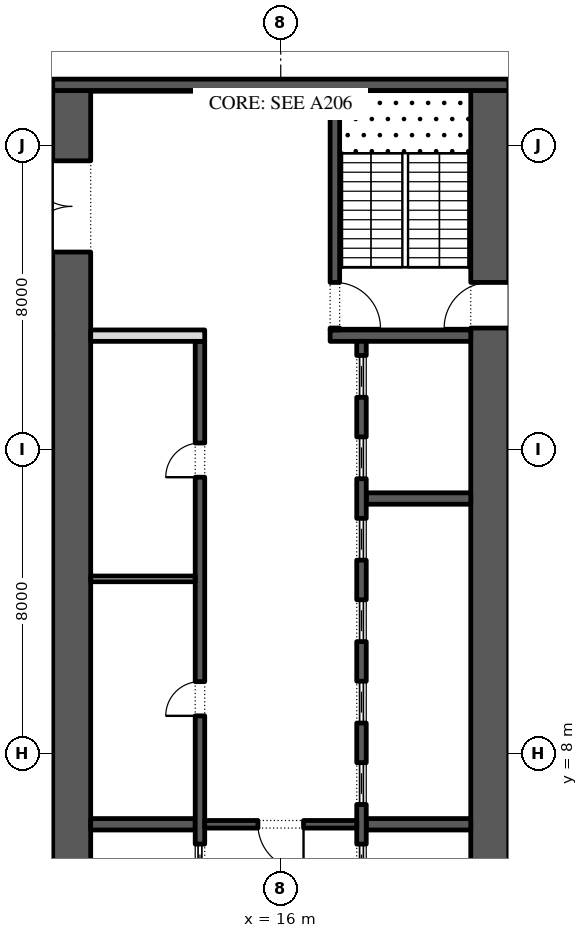
"""IFC4 building model, lengths in metres.
Left out: names, types, materials, properties, quantities, classifications, styles, units other than length and angle.
Written with IfcOpenShell. Run it as: python <this file> out.ifc"""

import sys

from ifc_helpers import new_model, si_unit, direction, frame, frame_2d, origin, place, context, subcontext, project, spatial, rectangle, extrude, element, fill, save


model = new_model("IFC4")
c1 = context("Model", 3, precision=1e-05, world=origin(), true_north=direction((0.0, 1.0)))
c2 = subcontext(c1, "Body", "Model", "MODEL_VIEW")
j1 = project(units=[si_unit("LENGTHUNIT", "METRE"), si_unit("PLANEANGLEUNIT", "RADIAN")], contexts=[c1])
p1 = place(None, origin())
s1 = spatial("IfcSite", under=j1, at=p1, CompositionType="ELEMENT")
p2 = place(p1, origin())
s2 = spatial("IfcBuilding", under=s1, at=p2, CompositionType="ELEMENT")
p3 = place(p2, frame((0.0, 0.0, 19.2)))
s3 = spatial("IfcBuildingStorey", under=s2, at=p3, CompositionType="ELEMENT", Elevation=19.2)
p4 = place(p3, frame((21.5, -2.45, 0.0), z_axis=(0.0, 0.0, 1.0), x_axis=(0.0, 1.0, 0.0)))
e1 = element("IfcWall", 1, at=p4, inside=s3, PredefinedType="SHEAR", context=c2, shape_type="SweptSolid", body=[
    extrude(rectangle(XDim=27.9, YDim=1.0, at=frame_2d((13.95, 0.0))), origin(), (0.0, 0.0, 1.0), 4.5),
])
p5 = place(p4, frame((5.05, 0.0, 0.0)))
e2 = element("IfcOpeningElement", 2, at=p5, cuts=e1, PredefinedType="OPENING", context=c2, shape_type="SweptSolid", body=[
    extrude(rectangle(XDim=1.2, YDim=2.1, at=frame_2d((0.6, 1.05))), frame((0.0, 0.51, 0.0), z_axis=(0.0, -1.0, 0.0), x_axis=(1.0, 0.0, 0.0)), (0.0, 0.0, 1.0), 1.02),
])
p6 = place(p4, frame((21.65, 0.0, 0.0)))
e3 = element("IfcOpeningElement", 3, at=p6, cuts=e1, PredefinedType="OPENING", context=c2, shape_type="SweptSolid", body=[
    extrude(rectangle(XDim=1.2, YDim=2.1, at=frame_2d((0.6, 1.05))), frame((0.0, 0.51, 0.0), z_axis=(0.0, -1.0, 0.0), x_axis=(1.0, 0.0, 0.0)), (0.0, 0.0, 1.0), 1.02),
])
p7 = place(p3, frame((10.5, -2.45, 0.0), z_axis=(0.0, 0.0, 1.0), x_axis=(0.0, 1.0, 0.0)))
e4 = element("IfcWall", 4, at=p7, inside=s3, PredefinedType="SHEAR", context=c2, shape_type="SweptSolid", body=[
    extrude(rectangle(XDim=27.9, YDim=1.0, at=frame_2d((13.95, 0.0))), origin(), (0.0, 0.0, 1.0), 4.5),
])
p8 = place(p7, frame((23.65, 0.0, 0.0)))
e5 = element("IfcOpeningElement", 5, at=p8, cuts=e4, PredefinedType="OPENING", context=c2, shape_type="SweptSolid", body=[
    extrude(rectangle(XDim=2.4, YDim=2.1, at=frame_2d((1.2, 1.05))), frame((0.0, 0.51, 0.0), z_axis=(0.0, -1.0, 0.0), x_axis=(1.0, 0.0, 0.0)), (0.0, 0.0, 1.0), 1.02),
])
p9 = place(p7, frame((1.387, 0.0, 0.0)))
e6 = element("IfcOpeningElement", 6, at=p9, cuts=e4, PredefinedType="OPENING", context=c2, shape_type="SweptSolid", body=[
    extrude(rectangle(XDim=0.9, YDim=2.1, at=frame_2d((0.45, 1.05))), frame((0.0, 0.51, 0.0), z_axis=(0.0, -1.0, 0.0), x_axis=(1.0, 0.0, 0.0)), (0.0, 0.0, 1.0), 1.02),
])
p10 = place(p7, frame((4.613, 0.0, 0.0)))
e7 = element("IfcOpeningElement", 7, at=p10, cuts=e4, PredefinedType="OPENING", context=c2, shape_type="SweptSolid", body=[
    extrude(rectangle(XDim=0.9, YDim=2.1, at=frame_2d((0.45, 1.05))), frame((0.0, 0.51, 0.0), z_axis=(0.0, -1.0, 0.0), x_axis=(1.0, 0.0, 0.0)), (0.0, 0.0, 1.0), 1.02),
])
p11 = place(p3, frame((10.0, 25.6, 0.0), z_axis=(0.0, 0.0, 1.0), x_axis=(1.0, 0.0, 0.0)))
e8 = element("IfcWall", 8, at=p11, inside=s3, PredefinedType="SHEAR", context=c2, shape_type="SweptSolid", body=[
    extrude(rectangle(XDim=12.0, YDim=0.3, at=frame_2d((6.0, 0.0))), origin(), (0.0, 0.0, 1.0), 4.5),
])
p12 = place(p3, frame((17.3, 19.0, 0.0), z_axis=(0.0, 0.0, 1.0), x_axis=(1.0, 0.0, 0.0)))
e9 = element("IfcWall", 9, at=p12, inside=s3, PredefinedType="SHEAR", context=c2, shape_type="SweptSolid", body=[
    extrude(rectangle(XDim=3.7, YDim=0.3, at=frame_2d((1.85, 0.0))), origin(), (0.0, 0.0, 1.0), 4.5),
])
p13 = place(p3, frame((17.425, 19.15, 0.0), z_axis=(0.0, 0.0, 1.0), x_axis=(0.0, 1.0, 0.0)))
e10 = element("IfcWall", 10, at=p13, inside=s3, PredefinedType="SHEAR", context=c2, shape_type="SweptSolid", body=[
    extrude(rectangle(XDim=6.3, YDim=0.25, at=frame_2d((3.15, 0.0))), origin(), (0.0, 0.0, 1.0), 4.5),
])
p14 = place(p13, frame((0.05, 0.0, 0.0)))
e11 = element("IfcOpeningElement", 11, at=p14, cuts=e10, PredefinedType="OPENING", context=c2, shape_type="SweptSolid", body=[
    extrude(rectangle(XDim=1.2, YDim=2.1, at=frame_2d((0.6, 1.05))), frame((0.0, 0.135, 0.0), z_axis=(0.0, -1.0, 0.0), x_axis=(1.0, 0.0, 0.0)), (0.0, 0.0, 1.0), 0.27),
])
for number, where, z_axis, x_axis in (
    (12, (18.25, 6.143, 0.0), (0.0, 0.0, 1.0), (1.0, 0.0, 0.0)),
    (13, (18.25, 14.714, 0.0), (0.0, 0.0, 1.0), (1.0, 0.0, 0.0)),
):
    element("IfcWall", number, at=place(p3, frame(where, z_axis=z_axis, x_axis=x_axis)), inside=s3, PredefinedType="SHEAR", context=c2, shape_type="SweptSolid", body=[
        extrude(rectangle(XDim=2.75, YDim=0.3, at=frame_2d((1.375, 0.0))), origin(), (0.0, 0.0, 1.0), 4.5),
    ])
p15 = place(p3, frame((18.125, 4.15, 0.0), z_axis=(0.0, 0.0, 1.0), x_axis=(0.0, 1.0, 0.0)))
e14 = element("IfcWall", 14, at=p15, inside=s3, PredefinedType="SHEAR", context=c2, shape_type="SweptSolid", body=[
    extrude(rectangle(XDim=14.7, YDim=0.25, at=frame_2d((7.35, 0.0))), origin(), (0.0, 0.0, 1.0), 4.5),
])
p16 = place(p15, frame((0.371, 0.0, 0.0)))
e15 = element("IfcOpeningElement", 15, at=p16, cuts=e14, PredefinedType="OPENING", context=c2, shape_type="SweptSolid", body=[
    extrude(rectangle(XDim=1.1, YDim=2.1, at=frame_2d((0.55, 1.05))), frame((0.0, 0.135, 0.0), z_axis=(0.0, -1.0, 0.0), x_axis=(1.0, 0.0, 0.0)), (0.0, 0.0, 1.0), 0.27),
])
p17 = place(p15, frame((2.514, 0.0, 0.0)))
e16 = element("IfcOpeningElement", 16, at=p17, cuts=e14, PredefinedType="OPENING", context=c2, shape_type="SweptSolid", body=[
    extrude(rectangle(XDim=1.1, YDim=2.1, at=frame_2d((0.55, 1.05))), frame((0.0, 0.135, 0.0), z_axis=(0.0, -1.0, 0.0), x_axis=(1.0, 0.0, 0.0)), (0.0, 0.0, 1.0), 0.27),
])
p18 = place(p15, frame((4.657, 0.0, 0.0)))
e17 = element("IfcOpeningElement", 17, at=p18, cuts=e14, PredefinedType="OPENING", context=c2, shape_type="SweptSolid", body=[
    extrude(rectangle(XDim=1.1, YDim=2.1, at=frame_2d((0.55, 1.05))), frame((0.0, 0.135, 0.0), z_axis=(0.0, -1.0, 0.0), x_axis=(1.0, 0.0, 0.0)), (0.0, 0.0, 1.0), 0.27),
])
p19 = place(p15, frame((6.8, 0.0, 0.0)))
e18 = element("IfcOpeningElement", 18, at=p19, cuts=e14, PredefinedType="OPENING", context=c2, shape_type="SweptSolid", body=[
    extrude(rectangle(XDim=1.1, YDim=2.1, at=frame_2d((0.55, 1.05))), frame((0.0, 0.135, 0.0), z_axis=(0.0, -1.0, 0.0), x_axis=(1.0, 0.0, 0.0)), (0.0, 0.0, 1.0), 0.27),
])
p20 = place(p15, frame((8.943, 0.0, 0.0)))
e19 = element("IfcOpeningElement", 19, at=p20, cuts=e14, PredefinedType="OPENING", context=c2, shape_type="SweptSolid", body=[
    extrude(rectangle(XDim=1.1, YDim=2.1, at=frame_2d((0.55, 1.05))), frame((0.0, 0.135, 0.0), z_axis=(0.0, -1.0, 0.0), x_axis=(1.0, 0.0, 0.0)), (0.0, 0.0, 1.0), 0.27),
])
p21 = place(p15, frame((11.086, 0.0, 0.0)))
e20 = element("IfcOpeningElement", 20, at=p21, cuts=e14, PredefinedType="OPENING", context=c2, shape_type="SweptSolid", body=[
    extrude(rectangle(XDim=1.1, YDim=2.1, at=frame_2d((0.55, 1.05))), frame((0.0, 0.135, 0.0), z_axis=(0.0, -1.0, 0.0), x_axis=(1.0, 0.0, 0.0)), (0.0, 0.0, 1.0), 0.27),
])
p22 = place(p15, frame((13.229, 0.0, 0.0)))
e21 = element("IfcOpeningElement", 21, at=p22, cuts=e14, PredefinedType="OPENING", context=c2, shape_type="SweptSolid", body=[
    extrude(rectangle(XDim=1.1, YDim=2.1, at=frame_2d((0.55, 1.05))), frame((0.0, 0.135, 0.0), z_axis=(0.0, -1.0, 0.0), x_axis=(1.0, 0.0, 0.0)), (0.0, 0.0, 1.0), 0.27),
])
p23 = place(p3, frame((11.0, 6.143, 0.0), z_axis=(0.0, 0.0, 1.0), x_axis=(1.0, 0.0, 0.0)))
e22 = element("IfcWall", 22, at=p23, inside=s3, PredefinedType="SHEAR", context=c2, shape_type="SweptSolid", body=[
    extrude(rectangle(XDim=2.75, YDim=0.3, at=frame_2d((1.375, 0.0))), origin(), (0.0, 0.0, 1.0), 4.5),
])
p24 = place(p3, frame((13.875, -2.45, 0.0), z_axis=(0.0, 0.0, 1.0), x_axis=(0.0, 1.0, 0.0)))
e23 = element("IfcWall", 23, at=p24, inside=s3, PredefinedType="SHEAR", context=c2, shape_type="SweptSolid", body=[
    extrude(rectangle(XDim=21.3, YDim=0.25, at=frame_2d((10.65, 0.0))), origin(), (0.0, 0.0, 1.0), 4.5),
])
p25 = place(p24, frame((11.446, 0.0, 0.0)))
e24 = element("IfcOpeningElement", 24, at=p25, cuts=e23, PredefinedType="OPENING", context=c2, shape_type="SweptSolid", body=[
    extrude(rectangle(XDim=0.9, YDim=2.1, at=frame_2d((0.45, 1.05))), frame((0.0, 0.135, 0.0), z_axis=(0.0, -1.0, 0.0), x_axis=(1.0, 0.0, 0.0)), (0.0, 0.0, 1.0), 0.27),
])
p26 = place(p24, frame((17.725, 0.0, 0.0)))
e25 = element("IfcOpeningElement", 25, at=p26, cuts=e23, PredefinedType="OPENING", context=c2, shape_type="SweptSolid", body=[
    extrude(rectangle(XDim=0.9, YDim=2.1, at=frame_2d((0.45, 1.05))), frame((0.0, 0.135, 0.0), z_axis=(0.0, -1.0, 0.0), x_axis=(1.0, 0.0, 0.0)), (0.0, 0.0, 1.0), 0.27),
])
p27 = place(p24, frame((6.971, 0.0, 0.0)))
e26 = element("IfcOpeningElement", 26, at=p27, cuts=e23, PredefinedType="OPENING", context=c2, shape_type="SweptSolid", body=[
    extrude(rectangle(XDim=1.1, YDim=2.1, at=frame_2d((0.55, 1.05))), frame((0.0, 0.135, 0.0), z_axis=(0.0, -1.0, 0.0), x_axis=(1.0, 0.0, 0.0)), (0.0, 0.0, 1.0), 0.27),
])
p28 = place(p3, frame((11.0, 19.0, 0.0), z_axis=(0.0, 0.0, 1.0), x_axis=(1.0, 0.0, 0.0)))
e27 = element("IfcWall", 27, at=p28, inside=s3, PredefinedType="PARTITIONING", context=c2, shape_type="SweptSolid", body=[
    extrude(rectangle(XDim=3.0, YDim=0.3, at=frame_2d((1.5, 0.0))), origin(), (0.0, 0.0, 1.0), 4.5),
])
p29 = place(p3, frame((11.0, 12.6, 0.0), z_axis=(0.0, 0.0, 1.0), x_axis=(1.0, 0.0, 0.0)))
e28 = element("IfcWall", 28, at=p29, inside=s3, PredefinedType="PARTITIONING", context=c2, shape_type="SweptSolid", body=[
    extrude(rectangle(XDim=2.75, YDim=0.15, at=frame_2d((1.375, 0.0))), origin(), (0.0, 0.0, 1.0), 4.5),
])
p30 = place(p3, frame((14.0, 6.143, 0.0), z_axis=(0.0, 0.0, 1.0), x_axis=(1.0, 0.0, 0.0)))
e29 = element("IfcWall", 29, at=p30, inside=s3, PredefinedType="SHEAR", context=c2, shape_type="SweptSolid", body=[
    extrude(rectangle(XDim=4.0, YDim=0.2, at=frame_2d((2.0, 0.0))), origin(), (0.0, 0.0, 1.0), 4.5),
])
p31 = place(p30, frame((1.4, 0.0, 0.0)))
e30 = element("IfcOpeningElement", 30, at=p31, cuts=e29, PredefinedType="OPENING", context=c2, shape_type="SweptSolid", body=[
    extrude(rectangle(XDim=1.2, YDim=2.1, at=frame_2d((0.6, 1.05))), frame((0.0, 0.11, 0.0), z_axis=(0.0, -1.0, 0.0), x_axis=(1.0, 0.0, 0.0)), (0.0, 0.0, 1.0), 0.22),
])
p32 = place(p16, origin())
e31 = element("IfcDoor", 31, at=p32, inside=s3, OperationType="SLIDING_TO_LEFT", PredefinedType="DOOR", context=c2, shape_type="SweptSolid", body=[
    extrude(rectangle(XDim=1.1, YDim=2.1, at=frame_2d((0.55, 1.05))), frame((0.0, 0.025, 0.0), z_axis=(0.0, -1.0, 0.0), x_axis=(1.0, 0.0, 0.0)), (0.0, 0.0, 1.0), 0.05),
])
fill(e15, e31)
p33 = place(p17, origin())
e32 = element("IfcDoor", 32, at=p33, inside=s3, OperationType="SLIDING_TO_LEFT", PredefinedType="DOOR", context=c2, shape_type="SweptSolid", body=[
    extrude(rectangle(XDim=1.1, YDim=2.1, at=frame_2d((0.55, 1.05))), frame((0.0, 0.025, 0.0), z_axis=(0.0, -1.0, 0.0), x_axis=(1.0, 0.0, 0.0)), (0.0, 0.0, 1.0), 0.05),
])
fill(e16, e32)
p34 = place(p18, origin())
e33 = element("IfcDoor", 33, at=p34, inside=s3, OperationType="SLIDING_TO_LEFT", PredefinedType="DOOR", context=c2, shape_type="SweptSolid", body=[
    extrude(rectangle(XDim=1.1, YDim=2.1, at=frame_2d((0.55, 1.05))), frame((0.0, 0.025, 0.0), z_axis=(0.0, -1.0, 0.0), x_axis=(1.0, 0.0, 0.0)), (0.0, 0.0, 1.0), 0.05),
])
fill(e17, e33)
p35 = place(p19, origin())
e34 = element("IfcDoor", 34, at=p35, inside=s3, OperationType="SLIDING_TO_LEFT", PredefinedType="DOOR", context=c2, shape_type="SweptSolid", body=[
    extrude(rectangle(XDim=1.1, YDim=2.1, at=frame_2d((0.55, 1.05))), frame((0.0, 0.025, 0.0), z_axis=(0.0, -1.0, 0.0), x_axis=(1.0, 0.0, 0.0)), (0.0, 0.0, 1.0), 0.05),
])
fill(e18, e34)
p36 = place(p20, origin())
e35 = element("IfcDoor", 35, at=p36, inside=s3, OperationType="SLIDING_TO_LEFT", PredefinedType="DOOR", context=c2, shape_type="SweptSolid", body=[
    extrude(rectangle(XDim=1.1, YDim=2.1, at=frame_2d((0.55, 1.05))), frame((0.0, 0.025, 0.0), z_axis=(0.0, -1.0, 0.0), x_axis=(1.0, 0.0, 0.0)), (0.0, 0.0, 1.0), 0.05),
])
fill(e19, e35)
p37 = place(p21, origin())
e36 = element("IfcDoor", 36, at=p37, inside=s3, OperationType="SLIDING_TO_LEFT", PredefinedType="DOOR", context=c2, shape_type="SweptSolid", body=[
    extrude(rectangle(XDim=1.1, YDim=2.1, at=frame_2d((0.55, 1.05))), frame((0.0, 0.025, 0.0), z_axis=(0.0, -1.0, 0.0), x_axis=(1.0, 0.0, 0.0)), (0.0, 0.0, 1.0), 0.05),
])
fill(e20, e36)
p38 = place(p22, origin())
e37 = element("IfcDoor", 37, at=p38, inside=s3, OperationType="SLIDING_TO_LEFT", PredefinedType="DOOR", context=c2, shape_type="SweptSolid", body=[
    extrude(rectangle(XDim=1.1, YDim=2.1, at=frame_2d((0.55, 1.05))), frame((0.0, 0.025, 0.0), z_axis=(0.0, -1.0, 0.0), x_axis=(1.0, 0.0, 0.0)), (0.0, 0.0, 1.0), 0.05),
])
fill(e21, e37)
p39 = place(p25, origin())
e38 = element("IfcDoor", 38, at=p39, inside=s3, OperationType="SINGLE_SWING_RIGHT", PredefinedType="DOOR", context=c2, shape_type="SweptSolid", body=[
    extrude(rectangle(XDim=0.9, YDim=2.1, at=frame_2d((0.45, 1.05))), frame((0.0, 0.125, 0.0), z_axis=(0.0, -1.0, 0.0), x_axis=(1.0, 0.0, 0.0)), (0.0, 0.0, 1.0), 0.05),
])
fill(e24, e38)
p40 = place(p26, origin())
e39 = element("IfcDoor", 39, at=p40, inside=s3, OperationType="SINGLE_SWING_RIGHT", PredefinedType="DOOR", context=c2, shape_type="SweptSolid", body=[
    extrude(rectangle(XDim=0.9, YDim=2.1, at=frame_2d((0.45, 1.05))), frame((0.0, 0.125, 0.0), z_axis=(0.0, -1.0, 0.0), x_axis=(1.0, 0.0, 0.0)), (0.0, 0.0, 1.0), 0.05),
])
fill(e25, e39)
p41 = place(p27, origin())
e40 = element("IfcDoor", 40, at=p41, inside=s3, OperationType="SLIDING_TO_LEFT", PredefinedType="DOOR", context=c2, shape_type="SweptSolid", body=[
    extrude(rectangle(XDim=1.1, YDim=2.1, at=frame_2d((0.55, 1.05))), frame((0.0, 0.025, 0.0), z_axis=(0.0, -1.0, 0.0), x_axis=(1.0, 0.0, 0.0)), (0.0, 0.0, 1.0), 0.05),
])
fill(e26, e40)
p42 = place(p31, frame((1.2, 0.0, 0.0), z_axis=(0.0, 0.0, 1.0), x_axis=(-1.0, 0.0, 0.0)))
e41 = element("IfcDoor", 41, at=p42, inside=s3, OperationType="SINGLE_SWING_RIGHT", PredefinedType="DOOR", context=c2, shape_type="SweptSolid", body=[
    extrude(rectangle(XDim=1.2, YDim=2.1, at=frame_2d((0.6, 1.05))), frame((0.0, 0.025, 0.0), z_axis=(0.0, -1.0, 0.0), x_axis=(1.0, 0.0, 0.0)), (0.0, 0.0, 1.0), 0.05),
])
fill(e30, e41)
p43 = place(p8, origin())
e42 = element("IfcDoor", 42, at=p43, inside=s3, OperationType="DOUBLE_DOOR_SINGLE_SWING", PredefinedType="DOOR", context=c2, shape_type="SweptSolid", body=[
    extrude(rectangle(XDim=2.4, YDim=2.1, at=frame_2d((1.2, 1.05))), frame((0.0, 0.025, 0.0), z_axis=(0.0, -1.0, 0.0), x_axis=(1.0, 0.0, 0.0)), (0.0, 0.0, 1.0), 0.05),
])
fill(e5, e42)
p44 = place(p14, frame((1.2, 0.0, 0.0), z_axis=(0.0, 0.0, 1.0), x_axis=(-1.0, 0.0, 0.0)))
e43 = element("IfcDoor", 43, at=p44, inside=s3, OperationType="SINGLE_SWING_LEFT", PredefinedType="DOOR", context=c2, shape_type="SweptSolid", body=[
    extrude(rectangle(XDim=1.2, YDim=2.1, at=frame_2d((0.6, 1.05))), frame((0.0, 0.025, 0.0), z_axis=(0.0, -1.0, 0.0), x_axis=(1.0, 0.0, 0.0)), (0.0, 0.0, 1.0), 0.05),
])
fill(e11, e43)
p45 = place(p6, origin())
e44 = element("IfcDoor", 44, at=p45, inside=s3, OperationType="SINGLE_SWING_RIGHT", PredefinedType="DOOR", context=c2, shape_type="SweptSolid", body=[
    extrude(rectangle(XDim=1.2, YDim=2.1, at=frame_2d((0.6, 1.05))), frame((0.0, 0.025, 0.0), z_axis=(0.0, -1.0, 0.0), x_axis=(1.0, 0.0, 0.0)), (0.0, 0.0, 1.0), 0.05),
])
fill(e3, e44)
save(model, sys.argv[1])
